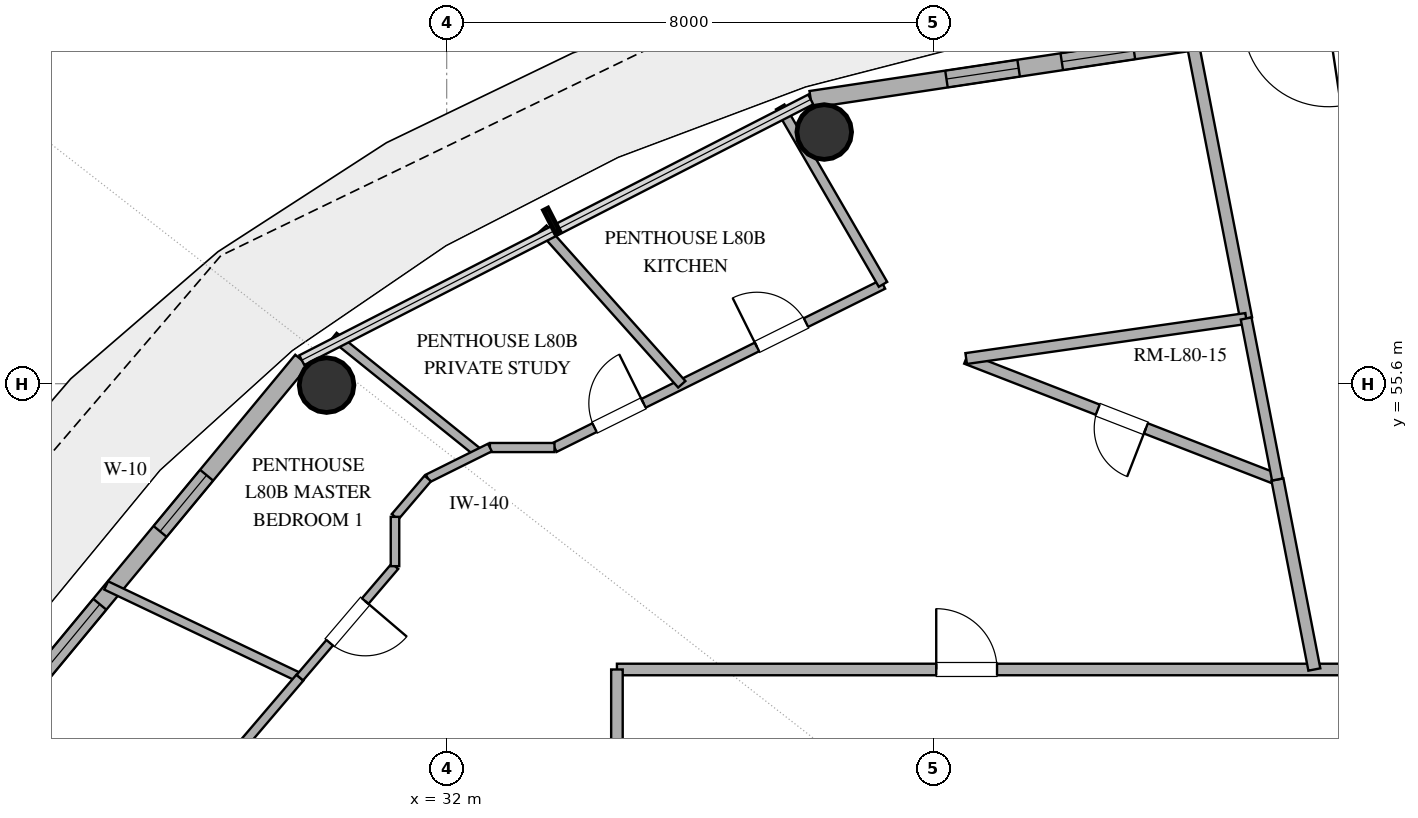
"""IFC4 building model, lengths in metres.
Left out: names, types, materials, properties, quantities, classifications, styles, units other than length and angle.
Written with IfcOpenShell. Run it as: python <this file> out.ifc"""

import sys

from ifc_helpers import new_model, si_unit, direction, frame, frame_2d, origin, origin_2d, place, context, subcontext, project, spatial, rectangle, hollow_circle, extrude, element, fill, save


model = new_model("IFC4")
c1 = context("Model", 3, precision=1e-05, world=origin(), true_north=direction((0.0, 1.0)))
c2 = subcontext(c1, "Body", "Model", "MODEL_VIEW")
j1 = project(units=[si_unit("LENGTHUNIT", "METRE"), si_unit("PLANEANGLEUNIT", "RADIAN")], contexts=[c1])
p1 = place(None, origin())
s1 = spatial("IfcSite", under=j1, at=p1, CompositionType="ELEMENT")
p2 = place(p1, origin())
s2 = spatial("IfcBuilding", under=s1, at=p2, CompositionType="ELEMENT")
p3 = place(p2, frame((0.0, 0.0, 309.0)))
s3 = spatial("IfcBuildingStorey", under=s2, at=p3, CompositionType="ELEMENT", Elevation=309.0)
for number, where, z_axis, x_axis in (
    (1, (38.209, 59.739, 0.0), (0.0, 0.0, 1.0), (1.0, 0.0, 0.0)),
    (2, (30.025, 55.576, 0.0), (0.0, 0.0, 1.0), (1.0, 0.0, 0.0)),
):
    element("IfcColumn", number, at=place(p3, frame(where, z_axis=z_axis, x_axis=x_axis)), inside=s3, PredefinedType="COLUMN", context=c2, shape_type="SweptSolid", body=[
        extrude(hollow_circle(Radius=0.45, WallThickness=0.025, at=origin_2d()), origin(), (0.0, 0.0, 1.0), 3.37),
    ])
p4 = place(p3, frame((48.0, 61.78, 0.0), z_axis=(0.0, 0.0, 1.0), x_axis=(-0.988882522213, -0.148698881169, 0.0)))
e3 = element("IfcWall", 3, at=p4, inside=s3, PredefinedType="SOLIDWALL", context=c2, shape_type="SweptSolid", body=[
    extrude(rectangle(XDim=10.125, YDim=0.28, at=frame_2d((5.062, 0.0))), origin(), (0.0, 0.0, 1.0), 3.37),
])
p5 = place(p4, frame((1.516, 0.0, 0.0)))
e4 = element("IfcOpeningElement", 4, at=p5, cuts=e3, PredefinedType="OPENING", context=c2, shape_type="SweptSolid", body=[
    extrude(rectangle(XDim=1.4, YDim=2.2, at=frame_2d((0.7, 1.1))), frame((0.0, 0.15, 0.0), z_axis=(0.0, -1.0, 0.0), x_axis=(1.0, 0.0, 0.0)), (0.0, 0.0, 1.0), 0.3),
])
p6 = place(p4, frame((4.75, 0.0, 0.85)))
e5 = element("IfcOpeningElement", 5, at=p6, cuts=e3, PredefinedType="OPENING", context=c2, shape_type="SweptSolid", body=[
    extrude(rectangle(XDim=1.2, YDim=1.8, at=frame_2d((0.6, 0.9))), frame((0.0, 0.15, 0.0), z_axis=(0.0, -1.0, 0.0), x_axis=(1.0, 0.0, 0.0)), (0.0, 0.0, 1.0), 0.3),
])
p7 = place(p4, frame((6.668, 0.0, 0.85)))
e6 = element("IfcOpeningElement", 6, at=p7, cuts=e3, PredefinedType="OPENING", context=c2, shape_type="SweptSolid", body=[
    extrude(rectangle(XDim=1.2, YDim=1.8, at=frame_2d((0.6, 0.9))), frame((0.0, 0.15, 0.0), z_axis=(0.0, -1.0, 0.0), x_axis=(1.0, 0.0, 0.0)), (0.0, 0.0, 1.0), 0.3),
])
p8 = place(p3, frame((29.617, 55.987, 0.0), z_axis=(0.0, 0.0, 1.0), x_axis=(-0.63761509934, -0.770355103243, 0.0)))
e7 = element("IfcWall", 7, at=p8, inside=s3, PredefinedType="SOLIDWALL", context=c2, shape_type="SweptSolid", body=[
    extrude(rectangle(XDim=8.33, YDim=0.28, at=frame_2d((4.165, 0.0))), origin(), (0.0, 0.0, 1.0), 3.37),
])
p9 = place(p8, frame((2.456, 0.0, 0.85)))
e8 = element("IfcOpeningElement", 8, at=p9, cuts=e7, PredefinedType="OPENING", context=c2, shape_type="SweptSolid", body=[
    extrude(rectangle(XDim=1.2, YDim=1.6, at=frame_2d((0.6, 0.8))), frame((0.0, 0.15, 0.0), z_axis=(0.0, -1.0, 0.0), x_axis=(1.0, 0.0, 0.0)), (0.0, 0.0, 1.0), 0.3),
])
p10 = place(p8, frame((5.211, 0.0, 0.85)))
e9 = element("IfcOpeningElement", 9, at=p10, cuts=e7, PredefinedType="OPENING", context=c2, shape_type="SweptSolid", body=[
    extrude(rectangle(XDim=1.5, YDim=2.0, at=frame_2d((0.75, 1.0))), frame((0.0, 0.15, 0.0), z_axis=(0.0, -1.0, 0.0), x_axis=(1.0, 0.0, 0.0)), (0.0, 0.0, 1.0), 0.3),
])
p11 = place(p3, frame((34.8, 50.9, 0.0), z_axis=(0.0, 0.0, 1.0), x_axis=(1.0, 0.0, 0.0)))
e10 = element("IfcWall", 10, at=p11, inside=s3, PredefinedType="PARTITIONING", context=c2, shape_type="SweptSolid", body=[
    extrude(rectangle(XDim=26.4, YDim=0.19, at=frame_2d((13.2, 0.0))), origin(), (0.0, 0.0, 1.0), 2.73),
])
p12 = place(p11, frame((18.419, 0.0, 0.0)))
e11 = element("IfcOpeningElement", 11, at=p12, cuts=e10, PredefinedType="OPENING", context=c2, shape_type="SweptSolid", body=[
    extrude(rectangle(XDim=1.0, YDim=2.2, at=frame_2d((0.5, 1.1))), frame((0.0, 0.105, 0.0), z_axis=(0.0, -1.0, 0.0), x_axis=(1.0, 0.0, 0.0)), (0.0, 0.0, 1.0), 0.21),
])
p13 = place(p11, frame((5.251, 0.0, 0.0)))
e12 = element("IfcOpeningElement", 12, at=p13, cuts=e10, PredefinedType="OPENING", context=c2, shape_type="SweptSolid", body=[
    extrude(rectangle(XDim=1.0, YDim=2.2, at=frame_2d((0.5, 1.1))), frame((0.0, 0.105, 0.0), z_axis=(0.0, -1.0, 0.0), x_axis=(1.0, 0.0, 0.0)), (0.0, 0.0, 1.0), 0.21),
])
p14 = place(p3, frame((34.8, 34.0, 0.0), z_axis=(0.0, 0.0, 1.0), x_axis=(0.0, 1.0, 0.0)))
e13 = element("IfcWall", 13, at=p14, inside=s3, PredefinedType="PARTITIONING", context=c2, shape_type="SweptSolid", body=[
    extrude(rectangle(XDim=16.9, YDim=0.19, at=frame_2d((8.45, 0.0))), origin(), (0.0, 0.0, 1.0), 2.73),
])
p15 = place(p14, frame((2.217, 0.0, 0.0)))
e14 = element("IfcOpeningElement", 14, at=p15, cuts=e13, PredefinedType="OPENING", context=c2, shape_type="SweptSolid", body=[
    extrude(rectangle(XDim=1.0, YDim=2.2, at=frame_2d((0.5, 1.1))), frame((0.0, 0.105, 0.0), z_axis=(0.0, -1.0, 0.0), x_axis=(1.0, 0.0, 0.0)), (0.0, 0.0, 1.0), 0.21),
])
p16 = place(p3, frame((45.663, 54.024, 0.0), z_axis=(0.0, 0.0, 1.0), x_axis=(-0.932122259713, 0.36214374625, 0.0)))
e15 = element("IfcWall", 15, at=p16, inside=s3, PredefinedType="PLUMBINGWALL", context=c2, shape_type="SweptSolid", body=[
    extrude(rectangle(XDim=5.492, YDim=0.18, at=frame_2d((2.746, 0.0))), origin(), (0.0, 0.0, 1.0), 2.73),
])
p17 = place(p16, frame((2.321, 0.0, 0.0)))
e16 = element("IfcOpeningElement", 16, at=p17, cuts=e15, PredefinedType="OPENING", context=c2, shape_type="SweptSolid", body=[
    extrude(rectangle(XDim=0.85, YDim=2.1, at=frame_2d((0.425, 1.05))), frame((0.0, 0.1, 0.0), z_axis=(0.0, -1.0, 0.0), x_axis=(1.0, 0.0, 0.0)), (0.0, 0.0, 1.0), 0.2),
])
p18 = place(p3, frame((44.241, 61.336, 0.0), z_axis=(0.0, 0.0, 1.0), x_axis=(0.190846277625, -0.981619935778, 0.0)))
e17 = element("IfcWall", 17, at=p18, inside=s3, PredefinedType="PARTITIONING", context=c2, shape_type="SweptSolid", body=[
    extrude(rectangle(XDim=4.751, YDim=0.2, at=frame_2d((2.375, 0.0))), origin(), (0.0, 0.0, 1.0), 2.73),
])
p19 = place(p3, frame((40.544, 56.013, 0.0), z_axis=(0.0, 0.0, 1.0), x_axis=(0.989914822191, 0.141663844385, 0.0)))
e18 = element("IfcWall", 18, at=p19, inside=s3, PredefinedType="PLUMBINGWALL", context=c2, shape_type="SweptSolid", body=[
    extrude(rectangle(XDim=4.651, YDim=0.18, at=frame_2d((2.326, 0.0))), origin(), (0.0, 0.0, 1.0), 2.73),
])
p20 = place(p3, frame((33.773, 54.55, 0.0), z_axis=(0.0, 0.0, 1.0), x_axis=(0.895589779493, 0.444880823219, 0.0)))
e19 = element("IfcWall", 19, at=p20, inside=s3, PredefinedType="PLUMBINGWALL", context=c2, shape_type="SweptSolid", body=[
    extrude(rectangle(XDim=6.032, YDim=0.16, at=frame_2d((3.016, 0.0))), origin(), (0.0, 0.0, 1.0), 2.73),
])
p21 = place(p20, frame((3.718, 0.0, 0.0)))
e20 = element("IfcOpeningElement", 20, at=p21, cuts=e19, PredefinedType="OPENING", context=c2, shape_type="SweptSolid", body=[
    extrude(rectangle(XDim=0.9, YDim=2.1, at=frame_2d((0.45, 1.05))), frame((0.0, 0.09, 0.0), z_axis=(0.0, -1.0, 0.0), x_axis=(1.0, 0.0, 0.0)), (0.0, 0.0, 1.0), 0.18),
])
p22 = place(p20, frame((0.735, 0.0, 0.0)))
e21 = element("IfcOpeningElement", 21, at=p22, cuts=e19, PredefinedType="OPENING", context=c2, shape_type="SweptSolid", body=[
    extrude(rectangle(XDim=0.9, YDim=2.1, at=frame_2d((0.45, 1.05))), frame((0.0, 0.09, 0.0), z_axis=(0.0, -1.0, 0.0), x_axis=(1.0, 0.0, 0.0)), (0.0, 0.0, 1.0), 0.18),
])
p23 = place(p3, frame((26.4, 52.282, 0.0), z_axis=(0.0, 0.0, 1.0), x_axis=(0.902924474477, -0.429799247777, 0.0)))
e22 = element("IfcWall", 22, at=p23, inside=s3, PredefinedType="PARTITIONING", context=c2, shape_type="SweptSolid", body=[
    extrude(rectangle(XDim=3.528, YDim=0.15, at=frame_2d((1.764, 0.0))), origin(), (0.0, 0.0, 1.0), 2.73),
])
p24 = place(p3, frame((35.866, 55.59, 0.0), z_axis=(0.0, 0.0, 1.0), x_axis=(-0.665966254354, 0.745981868453, 0.0)))
e23 = element("IfcWall", 23, at=p24, inside=s3, PredefinedType="PLUMBINGWALL", context=c2, shape_type="SweptSolid", body=[
    extrude(rectangle(XDim=3.429, YDim=0.16, at=frame_2d((1.715, 0.0))), origin(), (0.0, 0.0, 1.0), 2.73),
])
p25 = place(p3, frame((39.176, 57.234, 0.0), z_axis=(0.0, 0.0, 1.0), x_axis=(-0.501221763984, 0.865318867996, 0.0)))
e24 = element("IfcWall", 24, at=p25, inside=s3, PredefinedType="PLUMBINGWALL", context=c2, shape_type="SweptSolid", body=[
    extrude(rectangle(XDim=3.372, YDim=0.16, at=frame_2d((1.686, 0.0))), origin(), (0.0, 0.0, 1.0), 2.73),
])
p26 = place(p3, frame((29.585, 50.766, 0.0), z_axis=(0.0, 0.0, 1.0), x_axis=(-0.649223419945, -0.760597759, 0.0)))
e25 = element("IfcWall", 25, at=p26, inside=s3, PredefinedType="PARTITIONING", context=c2, shape_type="SweptSolid", body=[
    extrude(rectangle(XDim=3.183, YDim=0.15, at=frame_2d((1.591, 0.0))), origin(), (0.0, 0.0, 1.0), 2.73),
])
p27 = place(p3, frame((45.663, 54.024, 0.0), z_axis=(0.0, 0.0, 1.0), x_axis=(0.190832705503, -0.981622574369, 0.0)))
e26 = element("IfcWall", 26, at=p27, inside=s3, PredefinedType="PARTITIONING", context=c2, shape_type="SweptSolid", body=[
    extrude(rectangle(XDim=3.183, YDim=0.2, at=frame_2d((1.592, 0.0))), origin(), (0.0, 0.0, 1.0), 2.73),
])
p28 = place(p3, frame((30.143, 56.379, 0.0), z_axis=(0.0, 0.0, 1.0), x_axis=(0.778865360092, -0.627191159734, 0.0)))
e27 = element("IfcWall", 27, at=p28, inside=s3, PredefinedType="PARTITIONING", context=c2, shape_type="SweptSolid", body=[
    extrude(rectangle(XDim=3.062, YDim=0.15, at=frame_2d((1.531, 0.0))), origin(), (0.0, 0.0, 1.0), 2.73),
])
p29 = place(p3, frame((45.148, 56.672, 0.0), z_axis=(0.0, 0.0, 1.0), x_axis=(0.19071702476, -0.981645056253, 0.0)))
e28 = element("IfcWall", 28, at=p29, inside=s3, PredefinedType="PLUMBINGWALL", context=c2, shape_type="SweptSolid", body=[
    extrude(rectangle(XDim=2.697, YDim=0.18, at=frame_2d((1.349, 0.0))), origin(), (0.0, 0.0, 1.0), 2.73),
])
p30 = place(p3, frame((31.15, 52.599, 0.0), z_axis=(0.0, 0.0, 1.0), x_axis=(-0.649188051026, -0.760627947426, 0.0)))
e29 = element("IfcWall", 29, at=p30, inside=s3, PredefinedType="PARTITIONING", context=c2, shape_type="SweptSolid", body=[
    extrude(rectangle(XDim=2.41, YDim=0.14, at=frame_2d((1.205, 0.0))), origin(), (0.0, 0.0, 1.0), 2.73),
])
p31 = place(p30, frame((0.755, 0.0, 0.0)))
e30 = element("IfcOpeningElement", 30, at=p31, cuts=e29, PredefinedType="OPENING", context=c2, shape_type="SweptSolid", body=[
    extrude(rectangle(XDim=0.9, YDim=2.1, at=frame_2d((0.45, 1.05))), frame((0.0, 0.08, 0.0), z_axis=(0.0, -1.0, 0.0), x_axis=(1.0, 0.0, 0.0)), (0.0, 0.0, 1.0), 0.16),
])
p32 = place(p3, frame((32.711, 54.55, 0.0), z_axis=(0.0, 0.0, 1.0), x_axis=(1.0, 0.0, 0.0)))
e31 = element("IfcWall", 31, at=p32, inside=s3, PredefinedType="PARTITIONING", context=c2, shape_type="SweptSolid", body=[
    extrude(rectangle(XDim=1.062, YDim=0.15, at=frame_2d((0.531, 0.0))), origin(), (0.0, 0.0, 1.0), 2.73),
])
p33 = place(p3, frame((32.711, 54.55, 0.0), z_axis=(0.0, 0.0, 1.0), x_axis=(-0.895409226325, -0.445244109912, 0.0)))
e32 = element("IfcWall", 32, at=p33, inside=s3, PredefinedType="PARTITIONING", context=c2, shape_type="SweptSolid", body=[
    extrude(rectangle(XDim=1.141, YDim=0.14, at=frame_2d((0.571, 0.0))), origin(), (0.0, 0.0, 1.0), 2.73),
])
p34 = place(p3, frame((31.689, 54.042, 0.0), z_axis=(0.0, 0.0, 1.0), x_axis=(-0.649191857323, -0.760624698774, 0.0)))
e33 = element("IfcWall", 33, at=p34, inside=s3, PredefinedType="PARTITIONING", context=c2, shape_type="SweptSolid", body=[
    extrude(rectangle(XDim=0.83, YDim=0.14, at=frame_2d((0.415, 0.0))), origin(), (0.0, 0.0, 1.0), 2.73),
])
p35 = place(p3, frame((31.15, 53.41, 0.0), z_axis=(0.0, 0.0, 1.0), x_axis=(0.0, -1.0, 0.0)))
e34 = element("IfcWall", 34, at=p35, inside=s3, PredefinedType="PARTITIONING", context=c2, shape_type="SweptSolid", body=[
    extrude(rectangle(XDim=0.812, YDim=0.14, at=frame_2d((0.406, 0.0))), origin(), (0.0, 0.0, 1.0), 2.73),
])
p36 = place(p6, origin())
e35 = element("IfcWindow", 35, at=p36, inside=s3, PartitioningType="SINGLE_PANEL", PredefinedType="WINDOW", context=c2, shape_type="SweptSolid", body=[
    extrude(rectangle(XDim=1.2, YDim=1.8, at=frame_2d((0.6, 0.9))), frame((0.0, 0.03, 0.0), z_axis=(0.0, -1.0, 0.0), x_axis=(1.0, 0.0, 0.0)), (0.0, 0.0, 1.0), 0.06),
])
fill(e5, e35)
p37 = place(p7, origin())
e36 = element("IfcWindow", 36, at=p37, inside=s3, PartitioningType="SINGLE_PANEL", PredefinedType="WINDOW", context=c2, shape_type="SweptSolid", body=[
    extrude(rectangle(XDim=1.2, YDim=1.8, at=frame_2d((0.6, 0.9))), frame((0.0, 0.03, 0.0), z_axis=(0.0, -1.0, 0.0), x_axis=(1.0, 0.0, 0.0)), (0.0, 0.0, 1.0), 0.06),
])
fill(e6, e36)
p38 = place(p9, origin())
e37 = element("IfcWindow", 37, at=p38, inside=s3, PartitioningType="SINGLE_PANEL", PredefinedType="WINDOW", context=c2, shape_type="SweptSolid", body=[
    extrude(rectangle(XDim=1.2, YDim=1.6, at=frame_2d((0.6, 0.8))), frame((0.0, 0.03, 0.0), z_axis=(0.0, -1.0, 0.0), x_axis=(1.0, 0.0, 0.0)), (0.0, 0.0, 1.0), 0.06),
])
fill(e8, e37)
p39 = place(p10, origin())
e38 = element("IfcWindow", 38, at=p39, inside=s3, PartitioningType="SINGLE_PANEL", PredefinedType="WINDOW", context=c2, shape_type="SweptSolid", body=[
    extrude(rectangle(XDim=1.5, YDim=2.0, at=frame_2d((0.75, 1.0))), frame((0.0, 0.03, 0.0), z_axis=(0.0, -1.0, 0.0), x_axis=(1.0, 0.0, 0.0)), (0.0, 0.0, 1.0), 0.06),
])
fill(e9, e38)
p40 = place(p13, origin())
e39 = element("IfcDoor", 39, at=p40, inside=s3, OperationType="SINGLE_SWING_LEFT", PredefinedType="DOOR", context=c2, shape_type="SweptSolid", body=[
    extrude(rectangle(XDim=1.0, YDim=2.2, at=frame_2d((0.5, 1.1))), frame((0.0, 0.025, 0.0), z_axis=(0.0, -1.0, 0.0), x_axis=(1.0, 0.0, 0.0)), (0.0, 0.0, 1.0), 0.05),
])
fill(e12, e39)
p41 = place(p17, origin())
e40 = element("IfcDoor", 40, at=p41, inside=s3, OperationType="SINGLE_SWING_LEFT", PredefinedType="DOOR", context=c2, shape_type="SweptSolid", body=[
    extrude(rectangle(XDim=0.85, YDim=2.1, at=frame_2d((0.425, 1.05))), frame((0.0, 0.025, 0.0), z_axis=(0.0, -1.0, 0.0), x_axis=(1.0, 0.0, 0.0)), (0.0, 0.0, 1.0), 0.05),
])
fill(e16, e40)
p42 = place(p21, origin())
e41 = element("IfcDoor", 41, at=p42, inside=s3, OperationType="SINGLE_SWING_LEFT", PredefinedType="DOOR", context=c2, shape_type="SweptSolid", body=[
    extrude(rectangle(XDim=0.9, YDim=2.1, at=frame_2d((0.45, 1.05))), frame((0.0, 0.025, 0.0), z_axis=(0.0, -1.0, 0.0), x_axis=(1.0, 0.0, 0.0)), (0.0, 0.0, 1.0), 0.05),
])
fill(e20, e41)
p43 = place(p22, origin())
e42 = element("IfcDoor", 42, at=p43, inside=s3, OperationType="SINGLE_SWING_RIGHT", PredefinedType="DOOR", context=c2, shape_type="SweptSolid", body=[
    extrude(rectangle(XDim=0.9, YDim=2.1, at=frame_2d((0.45, 1.05))), frame((0.0, 0.025, 0.0), z_axis=(0.0, -1.0, 0.0), x_axis=(1.0, 0.0, 0.0)), (0.0, 0.0, 1.0), 0.05),
])
fill(e21, e42)
p44 = place(p31, origin())
e43 = element("IfcDoor", 43, at=p44, inside=s3, OperationType="SINGLE_SWING_LEFT", PredefinedType="DOOR", context=c2, shape_type="SweptSolid", body=[
    extrude(rectangle(XDim=0.9, YDim=2.1, at=frame_2d((0.45, 1.05))), frame((0.0, 0.025, 0.0), z_axis=(0.0, -1.0, 0.0), x_axis=(1.0, 0.0, 0.0)), (0.0, 0.0, 1.0), 0.05),
])
fill(e30, e43)
save(model, sys.argv[1])
